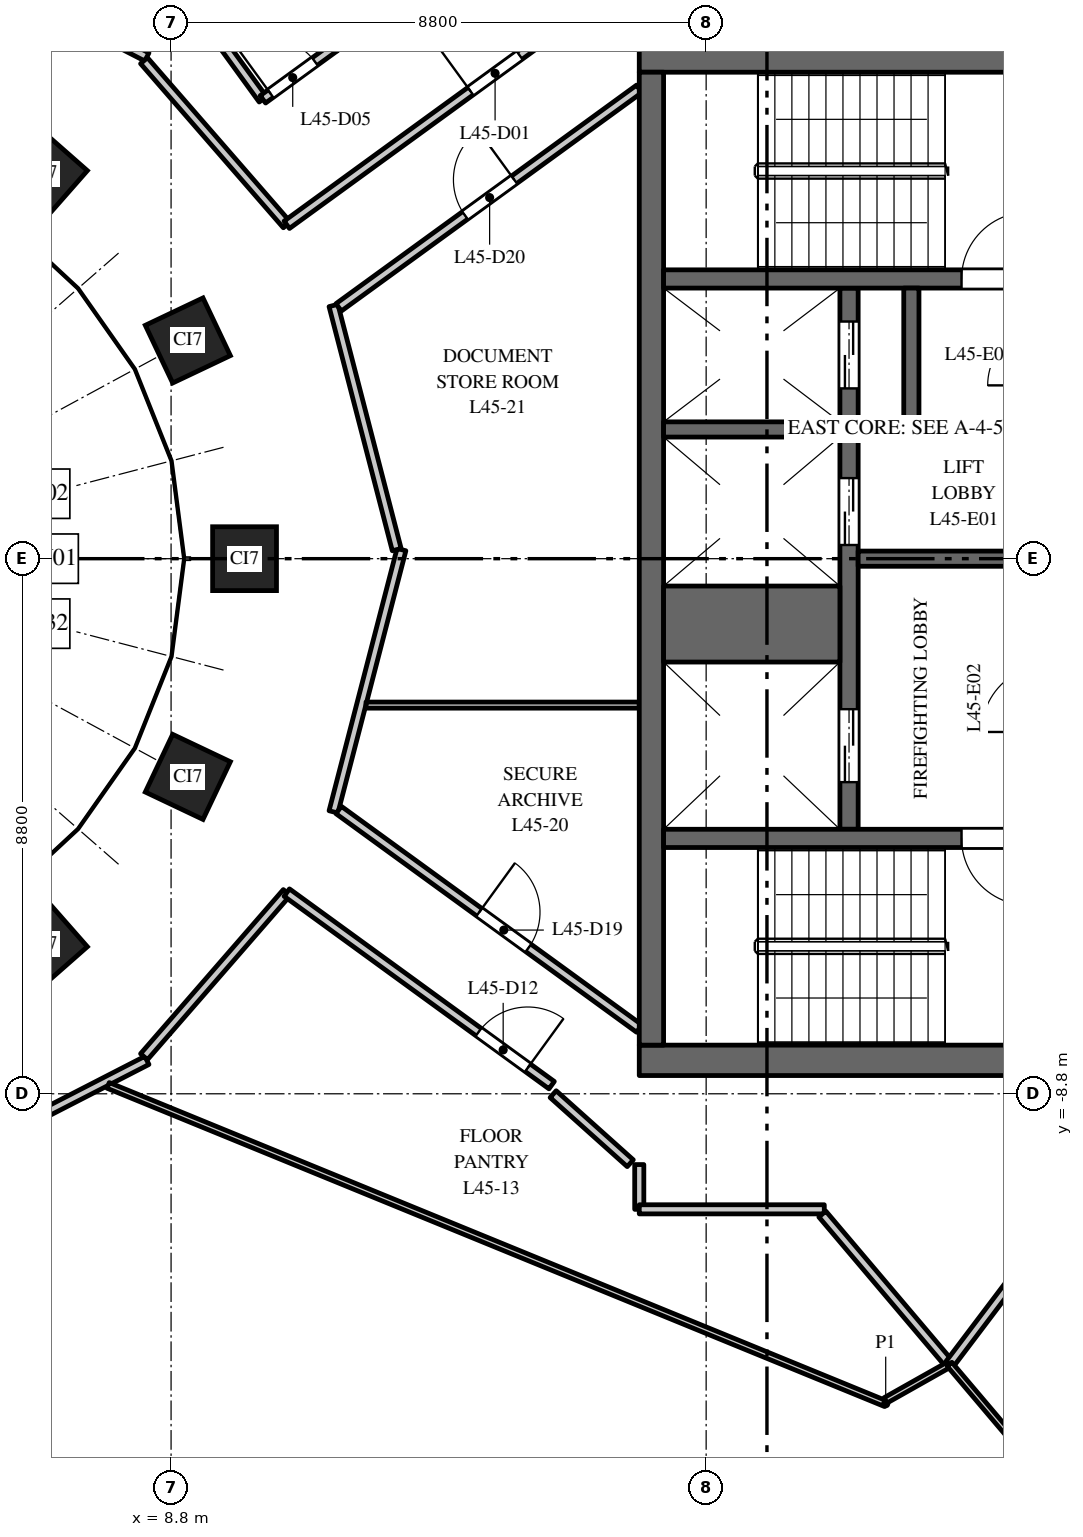
"""IFC4 building model, lengths in metres.
Left out: names, types, materials, properties, quantities, classifications, styles, units other than length and angle.
Written with IfcOpenShell. Run it as: python <this file> out.ifc"""

import sys

from ifc_helpers import new_model, si_unit, direction, frame, frame_2d, origin, origin_2d, place, context, subcontext, project, spatial, rectangle, extrude, element, fill, save


model = new_model("IFC4")
c1 = context("Model", 3, precision=1e-05, world=origin(), true_north=direction((0.0, 1.0)))
c2 = subcontext(c1, "Body", "Model", "MODEL_VIEW")
j1 = project(units=[si_unit("LENGTHUNIT", "METRE"), si_unit("PLANEANGLEUNIT", "RADIAN")], contexts=[c1])
p1 = place(None, origin())
s1 = spatial("IfcSite", under=j1, at=p1, CompositionType="ELEMENT")
p2 = place(p1, origin())
s2 = spatial("IfcBuilding", under=s1, at=p2, CompositionType="ELEMENT")
p3 = place(p2, frame((0.0, 0.0, 194.0)))
s3 = spatial("IfcBuildingStorey", under=s2, at=p3, CompositionType="ELEMENT", Elevation=194.0)
for number, where, z_axis, x_axis in (
    (1, (10.008, 0.0, 0.0), (0.0, 0.0, 1.0), (0.0, 1.0, 0.0)),
    (2, (9.076, 3.588, 0.0), (0.0, 0.0, 1.0), (-0.429, 0.903, 0.0)),
    (3, (6.682, 6.334, 0.0), (0.0, 0.0, 1.0), (-0.751, 0.66, 0.0)),
    (4, (6.682, -6.334, 0.0), (0.0, 0.0, 1.0), (0.751, 0.66, 0.0)),
    (5, (9.076, -3.588, 0.0), (0.0, 0.0, 1.0), (0.429, 0.903, 0.0)),
):
    element("IfcColumn", number, at=place(p3, frame(where, z_axis=z_axis, x_axis=x_axis)), inside=s3, PredefinedType="COLUMN", context=c2, shape_type="SweptSolid", body=[
        extrude(rectangle(XDim=1.05, YDim=1.05, at=origin_2d()), origin(), (0.0, 0.0, 1.0), 4.0),
    ])
p4 = place(p3, frame((16.5, 8.25, 0.0), z_axis=(0.0, 0.0, 1.0), x_axis=(1.0, 0.0, 0.0)))
e6 = element("IfcWall", 6, at=p4, inside=s3, PredefinedType="SHEAR", context=c2, shape_type="SweptSolid", body=[
    extrude(rectangle(XDim=15.0, YDim=0.5, at=frame_2d((7.5, 0.0))), origin(), (0.0, 0.0, 1.0), 3.7),
])
p5 = place(p4, frame((6.9, 0.0, 0.0)))
e7 = element("IfcOpeningElement", 7, at=p5, cuts=e6, PredefinedType="OPENING", context=c2, shape_type="SweptSolid", body=[
    extrude(rectangle(XDim=1.2, YDim=2.1, at=frame_2d((0.6, 1.05))), frame((0.0, 0.26, 0.0), z_axis=(0.0, -1.0, 0.0), x_axis=(1.0, 0.0, 0.0)), (0.0, 0.0, 1.0), 0.52),
])
p6 = place(p4, frame((12.05, 0.0, 0.0)))
e8 = element("IfcOpeningElement", 8, at=p6, cuts=e6, PredefinedType="OPENING", context=c2, shape_type="SweptSolid", body=[
    extrude(rectangle(XDim=0.9, YDim=2.1, at=frame_2d((0.45, 1.05))), frame((0.0, 0.26, 0.0), z_axis=(0.0, -1.0, 0.0), x_axis=(1.0, 0.0, 0.0)), (0.0, 0.0, 1.0), 0.52),
])
p7 = place(p3, frame((16.5, -8.25, 0.0), z_axis=(0.0, 0.0, 1.0), x_axis=(1.0, 0.0, 0.0)))
e9 = element("IfcWall", 9, at=p7, inside=s3, PredefinedType="SHEAR", context=c2, shape_type="SweptSolid", body=[
    extrude(rectangle(XDim=15.0, YDim=0.5, at=frame_2d((7.5, 0.0))), origin(), (0.0, 0.0, 1.0), 3.7),
])
p8 = place(p7, frame((6.9, 0.0, 0.0)))
e10 = element("IfcOpeningElement", 10, at=p8, cuts=e9, PredefinedType="OPENING", context=c2, shape_type="SweptSolid", body=[
    extrude(rectangle(XDim=1.2, YDim=2.1, at=frame_2d((0.6, 1.05))), frame((0.0, 0.26, 0.0), z_axis=(0.0, -1.0, 0.0), x_axis=(1.0, 0.0, 0.0)), (0.0, 0.0, 1.0), 0.52),
])
p9 = place(p7, frame((12.425, 0.0, 0.0)))
e11 = element("IfcOpeningElement", 11, at=p9, cuts=e9, PredefinedType="OPENING", context=c2, shape_type="SweptSolid", body=[
    extrude(rectangle(XDim=0.9, YDim=2.1, at=frame_2d((0.45, 1.05))), frame((0.0, 0.26, 0.0), z_axis=(0.0, -1.0, 0.0), x_axis=(1.0, 0.0, 0.0)), (0.0, 0.0, 1.0), 0.52),
])
p10 = place(p3, frame((19.95, -4.45, 0.0), z_axis=(0.0, 0.0, 1.0), x_axis=(0.0, 1.0, 0.0)))
e12 = element("IfcWall", 12, at=p10, inside=s3, PredefinedType="SHEAR", context=c2, shape_type="SweptSolid", body=[
    extrude(rectangle(XDim=8.9, YDim=0.3, at=frame_2d((4.45, 0.0))), origin(), (0.0, 0.0, 1.0), 3.7),
])
p11 = place(p10, frame((0.775, 0.0, 0.0)))
e13 = element("IfcOpeningElement", 13, at=p11, cuts=e12, PredefinedType="OPENING", context=c2, shape_type="SweptSolid", body=[
    extrude(rectangle(XDim=1.2, YDim=2.1, at=frame_2d((0.6, 1.05))), frame((0.0, 0.16, 0.0), z_axis=(0.0, -1.0, 0.0), x_axis=(1.0, 0.0, 0.0)), (0.0, 0.0, 1.0), 0.32),
])
p12 = place(p10, frame((4.675, 0.0, 0.0)))
e14 = element("IfcOpeningElement", 14, at=p12, cuts=e12, PredefinedType="OPENING", context=c2, shape_type="SweptSolid", body=[
    extrude(rectangle(XDim=1.1, YDim=2.1, at=frame_2d((0.55, 1.05))), frame((0.0, 0.16, 0.0), z_axis=(0.0, -1.0, 0.0), x_axis=(1.0, 0.0, 0.0)), (0.0, 0.0, 1.0), 0.32),
])
p13 = place(p10, frame((7.25, 0.0, 0.0)))
e15 = element("IfcOpeningElement", 15, at=p13, cuts=e12, PredefinedType="OPENING", context=c2, shape_type="SweptSolid", body=[
    extrude(rectangle(XDim=1.1, YDim=2.1, at=frame_2d((0.55, 1.05))), frame((0.0, 0.16, 0.0), z_axis=(0.0, -1.0, 0.0), x_axis=(1.0, 0.0, 0.0)), (0.0, 0.0, 1.0), 0.32),
])
p14 = place(p3, frame((20.1, 0.0, 0.0), z_axis=(0.0, 0.0, 1.0), x_axis=(1.0, 0.0, 0.0)))
e16 = element("IfcWall", 16, at=p14, inside=s3, PredefinedType="SHEAR", context=c2, shape_type="SweptSolid", body=[
    extrude(rectangle(XDim=3.28, YDim=0.25, at=frame_2d((1.64, 0.0))), origin(), (0.0, 0.0, 1.0), 3.7),
])
p15 = place(p3, frame((16.7, -8.0, 0.0), z_axis=(0.0, 0.0, 1.0), x_axis=(0.0, 1.0, 0.0)))
e17 = element("IfcWall", 17, at=p15, inside=s3, PredefinedType="SHEAR", context=c2, shape_type="SweptSolid", body=[
    extrude(rectangle(XDim=16.0, YDim=0.4, at=frame_2d((8.0, 0.0))), origin(), (0.0, 0.0, 1.0), 3.7),
])
p16 = place(p3, frame((16.9, -1.075, 0.0), z_axis=(0.0, 0.0, 1.0), x_axis=(1.0, 0.0, 0.0)))
e18 = element("IfcWall", 18, at=p16, inside=s3, PredefinedType="SHEAR", context=c2, shape_type="SweptSolid", body=[
    extrude(rectangle(XDim=2.9, YDim=1.25, at=frame_2d((1.45, 0.0))), origin(), (0.0, 0.0, 1.0), 3.7),
])
p17 = place(p3, frame((16.9, 2.125, 0.0), z_axis=(0.0, 0.0, 1.0), x_axis=(1.0, 0.0, 0.0)))
e19 = element("IfcWall", 19, at=p17, inside=s3, PredefinedType="SHEAR", context=c2, shape_type="SweptSolid", body=[
    extrude(rectangle(XDim=2.9, YDim=0.25, at=frame_2d((1.45, 0.0))), origin(), (0.0, 0.0, 1.0), 3.7),
])
p18 = place(p3, frame((16.9, 4.6, 0.0), z_axis=(0.0, 0.0, 1.0), x_axis=(1.0, 0.0, 0.0)))
e20 = element("IfcWall", 20, at=p18, inside=s3, PredefinedType="SHEAR", context=c2, shape_type="SweptSolid", body=[
    extrude(rectangle(XDim=6.18, YDim=0.3, at=frame_2d((3.09, 0.0))), origin(), (0.0, 0.0, 1.0), 3.7),
])
p19 = place(p18, frame((4.9, 0.0, 0.0)))
e21 = element("IfcOpeningElement", 21, at=p19, cuts=e20, PredefinedType="OPENING", context=c2, shape_type="SweptSolid", body=[
    extrude(rectangle(XDim=1.1, YDim=2.1, at=frame_2d((0.55, 1.05))), frame((0.0, 0.16, 0.0), z_axis=(0.0, -1.0, 0.0), x_axis=(1.0, 0.0, 0.0)), (0.0, 0.0, 1.0), 0.32),
])
p20 = place(p3, frame((16.9, -4.6, 0.0), z_axis=(0.0, 0.0, 1.0), x_axis=(1.0, 0.0, 0.0)))
e22 = element("IfcWall", 22, at=p20, inside=s3, PredefinedType="SHEAR", context=c2, shape_type="SweptSolid", body=[
    extrude(rectangle(XDim=6.18, YDim=0.3, at=frame_2d((3.09, 0.0))), origin(), (0.0, 0.0, 1.0), 3.7),
])
p21 = place(p20, frame((4.9, 0.0, 0.0)))
e23 = element("IfcOpeningElement", 23, at=p21, cuts=e22, PredefinedType="OPENING", context=c2, shape_type="SweptSolid", body=[
    extrude(rectangle(XDim=1.1, YDim=2.1, at=frame_2d((0.55, 1.05))), frame((0.0, 0.16, 0.0), z_axis=(0.0, -1.0, 0.0), x_axis=(1.0, 0.0, 0.0)), (0.0, 0.0, 1.0), 0.32),
])
p22 = place(p3, frame((20.85, 2.125, 0.0), z_axis=(0.0, 0.0, 1.0), x_axis=(1.0, 0.0, 0.0)))
e24 = element("IfcWall", 24, at=p22, inside=s3, PredefinedType="SHEAR", context=c2, shape_type="SweptSolid", body=[
    extrude(rectangle(XDim=2.53, YDim=0.25, at=frame_2d((1.265, 0.0))), origin(), (0.0, 0.0, 1.0), 3.7),
])
p23 = place(p3, frame((20.975, 2.25, 0.0), z_axis=(0.0, 0.0, 1.0), x_axis=(0.0, 1.0, 0.0)))
e25 = element("IfcWall", 25, at=p23, inside=s3, PredefinedType="SHEAR", context=c2, shape_type="SweptSolid", body=[
    extrude(rectangle(XDim=2.2, YDim=0.25, at=frame_2d((1.1, 0.0))), origin(), (0.0, 0.0, 1.0), 3.7),
])
for number, where, z_axis, x_axis in (
    (26, (4.459, -10.278, 0.0), (0.0, 0.0, 1.0), (0.889, 0.457, 0.0)),
    (27, (4.459, 10.278, 0.0), (0.0, 0.0, 1.0), (0.889, -0.457, 0.0)),
):
    element("IfcWall", number, at=place(p3, frame(where, z_axis=z_axis, x_axis=x_axis)), inside=s3, PredefinedType="PARTITIONING", context=c2, shape_type="SweptSolid", body=[
        extrude(rectangle(XDim=4.434, YDim=0.15, at=frame_2d((2.217, 0.0))), origin(), (0.0, 0.0, 1.0), 2.85),
    ])
p24 = place(p3, frame((7.765, -8.662, 0.0), z_axis=(0.0, 0.0, 1.0), x_axis=(0.925461374611, -0.378841977747, 0.0)))
e28 = element("IfcWall", 28, at=p24, inside=s3, PredefinedType="PARTITIONING", context=c2, shape_type="SweptSolid", body=[
    extrude(rectangle(XDim=13.818, YDim=0.1, at=frame_2d((6.909, 0.0))), origin(), (0.0, 0.0, 1.0), 3.7),
])
p25 = place(p3, frame((8.195, 10.463, 0.0), z_axis=(0.0, 0.0, 1.0), x_axis=(0.58806271403, -0.80881533391, 0.0)))
e29 = element("IfcWall", 29, at=p25, inside=s3, PredefinedType="PARTITIONING", context=c2, shape_type="SweptSolid", body=[
    extrude(rectangle(XDim=3.596, YDim=0.15, at=frame_2d((1.798, 0.0))), origin(), (0.0, 0.0, 1.0), 3.7),
])
for number, where, z_axis, x_axis in (
    (30, (8.355, -8.19, 0.0), (0.0, 0.0, 1.0), (0.656, 0.754, 0.0)),
    (31, (8.355, 8.19, 0.0), (0.0, 0.0, 1.0), (0.656, -0.754, 0.0)),
):
    element("IfcWall", number, at=place(p3, frame(where, z_axis=z_axis, x_axis=x_axis)), inside=s3, PredefinedType="PARTITIONING", context=c2, shape_type="SweptSolid", body=[
        extrude(rectangle(XDim=3.577, YDim=0.15, at=frame_2d((1.789, 0.0))), origin(), (0.0, 0.0, 1.0), 2.75),
    ])
p26 = place(p3, frame((10.31, 7.554, 0.0), z_axis=(0.0, 0.0, 1.0), x_axis=(0.808663603061, 0.588271346476, 0.0)))
e32 = element("IfcWall", 32, at=p26, inside=s3, PredefinedType="PARTITIONING", context=c2, shape_type="SweptSolid", body=[
    extrude(rectangle(XDim=1.457, YDim=0.15, at=frame_2d((0.729, 0.0))), origin(), (0.0, 0.0, 1.0), 3.7),
])
p27 = place(p26, frame((0.157, 0.0, 0.0)))
e33 = element("IfcOpeningElement", 33, at=p27, cuts=e32, PredefinedType="OPENING", context=c2, shape_type="SweptSolid", body=[
    extrude(rectangle(XDim=0.9, YDim=2.1, at=frame_2d((0.45, 1.05))), frame((0.0, 0.085, 0.0), z_axis=(0.0, -1.0, 0.0), x_axis=(1.0, 0.0, 0.0)), (0.0, 0.0, 1.0), 0.17),
])
p28 = place(p3, frame((10.703, -5.491, 0.0), z_axis=(0.0, 0.0, 1.0), x_axis=(0.808838005268, -0.588031530816, 0.0)))
e34 = element("IfcWall", 34, at=p28, inside=s3, PredefinedType="PARTITIONING", context=c2, shape_type="SweptSolid", body=[
    extrude(rectangle(XDim=5.386, YDim=0.15, at=frame_2d((2.693, 0.0))), origin(), (0.0, 0.0, 1.0), 2.75),
])
p29 = place(p28, frame((3.9, 0.0, 0.0)))
e35 = element("IfcOpeningElement", 35, at=p29, cuts=e34, PredefinedType="OPENING", context=c2, shape_type="SweptSolid", body=[
    extrude(rectangle(XDim=1.0, YDim=2.1, at=frame_2d((0.5, 1.05))), frame((0.0, 0.085, 0.0), z_axis=(0.0, -1.0, 0.0), x_axis=(1.0, 0.0, 0.0)), (0.0, 0.0, 1.0), 0.17),
])
p30 = place(p3, frame((10.703, 5.491, 0.0), z_axis=(0.0, 0.0, 1.0), x_axis=(0.808838005268, 0.588031530816, 0.0)))
e36 = element("IfcWall", 36, at=p30, inside=s3, PredefinedType="PARTITIONING", context=c2, shape_type="SweptSolid", body=[
    extrude(rectangle(XDim=5.386, YDim=0.15, at=frame_2d((2.693, 0.0))), origin(), (0.0, 0.0, 1.0), 2.75),
])
p31 = place(p30, frame((3.736, 0.0, 0.0)))
e37 = element("IfcOpeningElement", 37, at=p31, cuts=e36, PredefinedType="OPENING", context=c2, shape_type="SweptSolid", body=[
    extrude(rectangle(XDim=1.0, YDim=2.1, at=frame_2d((0.5, 1.05))), frame((0.0, 0.085, 0.0), z_axis=(0.0, -1.0, 0.0), x_axis=(1.0, 0.0, 0.0)), (0.0, 0.0, 1.0), 0.17),
])
p32 = place(p3, frame((11.471, -4.164, 0.0), z_axis=(0.0, 0.0, 1.0), x_axis=(0.250958355571, 0.967997884176, 0.0)))
e38 = element("IfcWall", 38, at=p32, inside=s3, PredefinedType="PARTITIONING", context=c2, shape_type="SweptSolid", body=[
    extrude(rectangle(XDim=4.456, YDim=0.15, at=frame_2d((2.228, 0.0))), origin(), (0.0, 0.0, 1.0), 3.7),
])
p33 = place(p3, frame((11.556, -4.133, 0.0), z_axis=(0.0, 0.0, 1.0), x_axis=(0.808869060288, -0.587988812231, 0.0)))
e39 = element("IfcWall", 39, at=p33, inside=s3, PredefinedType="PARTITIONING", context=c2, shape_type="SweptSolid", body=[
    extrude(rectangle(XDim=6.112, YDim=0.15, at=frame_2d((3.056, 0.0))), origin(), (0.0, 0.0, 1.0), 3.7),
])
p34 = place(p33, frame((2.858, 0.0, 0.0)))
e40 = element("IfcOpeningElement", 40, at=p34, cuts=e39, PredefinedType="OPENING", context=c2, shape_type="SweptSolid", body=[
    extrude(rectangle(XDim=1.0, YDim=2.1, at=frame_2d((0.5, 1.05))), frame((0.0, 0.085, 0.0), z_axis=(0.0, -1.0, 0.0), x_axis=(1.0, 0.0, 0.0)), (0.0, 0.0, 1.0), 0.17),
])
p35 = place(p3, frame((11.471, 4.164, 0.0), z_axis=(0.0, 0.0, 1.0), x_axis=(0.250753789182, -0.968050895982, 0.0)))
e41 = element("IfcWall", 41, at=p35, inside=s3, PredefinedType="PARTITIONING", context=c2, shape_type="SweptSolid", body=[
    extrude(rectangle(XDim=4.148, YDim=0.15, at=frame_2d((2.074, 0.0))), origin(), (0.0, 0.0, 1.0), 3.7),
])
p36 = place(p3, frame((11.556, 4.133, 0.0), z_axis=(0.0, 0.0, 1.0), x_axis=(0.808869060288, 0.587988812231, 0.0)))
e42 = element("IfcWall", 42, at=p36, inside=s3, PredefinedType="PARTITIONING", context=c2, shape_type="SweptSolid", body=[
    extrude(rectangle(XDim=6.112, YDim=0.15, at=frame_2d((3.056, 0.0))), origin(), (0.0, 0.0, 1.0), 3.7),
])
p37 = place(p36, frame((2.57, 0.0, 0.0)))
e43 = element("IfcOpeningElement", 43, at=p37, cuts=e42, PredefinedType="OPENING", context=c2, shape_type="SweptSolid", body=[
    extrude(rectangle(XDim=1.0, YDim=2.1, at=frame_2d((0.5, 1.05))), frame((0.0, 0.085, 0.0), z_axis=(0.0, -1.0, 0.0), x_axis=(1.0, 0.0, 0.0)), (0.0, 0.0, 1.0), 0.17),
])
p38 = place(p3, frame((12.006, -2.408, 0.0), z_axis=(0.0, 0.0, 1.0), x_axis=(1.0, 0.0, 0.0)))
e44 = element("IfcWall", 44, at=p38, inside=s3, PredefinedType="PARTITIONING", context=c2, shape_type="SweptSolid", body=[
    extrude(rectangle(XDim=4.494, YDim=0.1, at=frame_2d((2.247, 0.0))), origin(), (0.0, 0.0, 1.0), 3.7),
])
p39 = place(p3, frame((16.5, -10.7, 0.0), z_axis=(0.0, 0.0, 1.0), x_axis=(0.0, 1.0, 0.0)))
e45 = element("IfcWall", 45, at=p39, inside=s3, PredefinedType="PARTITIONING", context=c2, shape_type="SweptSolid", body=[
    extrude(rectangle(XDim=0.736, YDim=0.15, at=frame_2d((0.368, 0.0))), origin(), (0.0, 0.0, 1.0), 3.7),
])
p40 = place(p3, frame((16.5, -10.7, 0.0), z_axis=(0.0, 0.0, 1.0), x_axis=(1.0, 0.0, 0.0)))
e46 = element("IfcWall", 46, at=p40, inside=s3, PredefinedType="PARTITIONING", context=c2, shape_type="SweptSolid", body=[
    extrude(rectangle(XDim=3.043, YDim=0.15, at=frame_2d((1.521, 0.0))), origin(), (0.0, 0.0, 1.0), 3.7),
])
p41 = place(p3, frame((19.511, -10.778, 0.0), z_axis=(0.0, 0.0, 1.0), x_axis=(0.646314086505, -0.763071491792, 0.0)))
e47 = element("IfcWall", 47, at=p41, inside=s3, PredefinedType="PARTITIONING", context=c2, shape_type="SweptSolid", body=[
    extrude(rectangle(XDim=3.237, YDim=0.15, at=frame_2d((1.618, 0.0))), origin(), (0.0, 0.0, 1.0), 3.7),
])
p42 = place(p3, frame((20.55, -13.842, 0.0), z_axis=(0.0, 0.0, 1.0), x_axis=(0.870976251911, 0.491325114978, 0.0)))
e48 = element("IfcWall", 48, at=p42, inside=s3, PredefinedType="PARTITIONING", context=c2, shape_type="SweptSolid", body=[
    extrude(rectangle(XDim=1.209, YDim=0.1, at=frame_2d((0.604, 0.0))), origin(), (0.0, 0.0, 1.0), 3.7),
])
p43 = place(p3, frame((21.603, -13.248, 0.0), z_axis=(0.0, 0.0, 1.0), x_axis=(0.60303683539, 0.797713341472, 0.0)))
e49 = element("IfcWall", 49, at=p43, inside=s3, PredefinedType="PARTITIONING", context=c2, shape_type="SweptSolid", body=[
    extrude(rectangle(XDim=3.288, YDim=0.15, at=frame_2d((1.644, 0.0))), origin(), (0.0, 0.0, 1.0), 2.75),
])
p44 = place(p3, frame((21.603, -13.248, 0.0), z_axis=(0.0, 0.0, 1.0), x_axis=(0.646437509972, -0.762966936179, 0.0)))
e50 = element("IfcWall", 50, at=p44, inside=s3, PredefinedType="PARTITIONING", context=c2, shape_type="SweptSolid", body=[
    extrude(rectangle(XDim=7.467, YDim=0.1, at=frame_2d((3.733, 0.0))), origin(), (0.0, 0.0, 1.0), 2.9),
])
p45 = place(p3, frame((16.352, -9.942, 0.0), z_axis=(0.0, 0.0, 1.0), x_axis=(-0.744832366149, 0.667251636444, 0.0)))
e51 = element("IfcWall", 51, at=p45, inside=s3, PredefinedType="PARTITIONING", context=c2, shape_type="SweptSolid", body=[
    extrude(rectangle(XDim=1.702, YDim=0.15, at=frame_2d((0.851, 0.0))), origin(), (0.0, 0.0, 1.0), 3.7),
])
p46 = place(p11, origin())
e52 = element("IfcDoor", 52, at=p46, inside=s3, OperationType="DOUBLE_DOOR_SLIDING", PredefinedType="DOOR", context=c2, shape_type="SweptSolid", body=[
    extrude(rectangle(XDim=1.2, YDim=2.1, at=frame_2d((0.6, 1.05))), frame((0.0, 0.025, 0.0), z_axis=(0.0, -1.0, 0.0), x_axis=(1.0, 0.0, 0.0)), (0.0, 0.0, 1.0), 0.05),
])
fill(e13, e52)
p47 = place(p12, origin())
e53 = element("IfcDoor", 53, at=p47, inside=s3, OperationType="DOUBLE_DOOR_SLIDING", PredefinedType="DOOR", context=c2, shape_type="SweptSolid", body=[
    extrude(rectangle(XDim=1.1, YDim=2.1, at=frame_2d((0.55, 1.05))), frame((0.0, 0.025, 0.0), z_axis=(0.0, -1.0, 0.0), x_axis=(1.0, 0.0, 0.0)), (0.0, 0.0, 1.0), 0.05),
])
fill(e14, e53)
p48 = place(p13, origin())
e54 = element("IfcDoor", 54, at=p48, inside=s3, OperationType="DOUBLE_DOOR_SLIDING", PredefinedType="DOOR", context=c2, shape_type="SweptSolid", body=[
    extrude(rectangle(XDim=1.1, YDim=2.1, at=frame_2d((0.55, 1.05))), frame((0.0, 0.025, 0.0), z_axis=(0.0, -1.0, 0.0), x_axis=(1.0, 0.0, 0.0)), (0.0, 0.0, 1.0), 0.05),
])
fill(e15, e54)
p49 = place(p19, origin())
e55 = element("IfcDoor", 55, at=p49, inside=s3, OperationType="SINGLE_SWING_LEFT", PredefinedType="DOOR", context=c2, shape_type="SweptSolid", body=[
    extrude(rectangle(XDim=1.1, YDim=2.1, at=frame_2d((0.55, 1.05))), frame((0.0, 0.025, 0.0), z_axis=(0.0, -1.0, 0.0), x_axis=(1.0, 0.0, 0.0)), (0.0, 0.0, 1.0), 0.05),
])
fill(e21, e55)
p50 = place(p21, origin())
e56 = element("IfcDoor", 56, at=p50, inside=s3, OperationType="SINGLE_SWING_RIGHT", PredefinedType="DOOR", context=c2, shape_type="SweptSolid", body=[
    extrude(rectangle(XDim=1.1, YDim=2.1, at=frame_2d((0.55, 1.05))), frame((0.0, 0.025, 0.0), z_axis=(0.0, -1.0, 0.0), x_axis=(1.0, 0.0, 0.0)), (0.0, 0.0, 1.0), 0.05),
])
fill(e23, e56)
p51 = place(p31, origin())
e57 = element("IfcDoor", 57, at=p51, inside=s3, OperationType="SINGLE_SWING_LEFT", PredefinedType="DOOR", context=c2, shape_type="SweptSolid", body=[
    extrude(rectangle(XDim=1.0, YDim=2.1, at=frame_2d((0.5, 1.05))), frame((0.0, 0.025, 0.0), z_axis=(0.0, -1.0, 0.0), x_axis=(1.0, 0.0, 0.0)), (0.0, 0.0, 1.0), 0.05),
])
fill(e37, e57)
p52 = place(p27, origin())
e58 = element("IfcDoor", 58, at=p52, inside=s3, OperationType="SINGLE_SWING_LEFT", PredefinedType="DOOR", context=c2, shape_type="SweptSolid", body=[
    extrude(rectangle(XDim=0.9, YDim=2.1, at=frame_2d((0.45, 1.05))), frame((0.0, 0.025, 0.0), z_axis=(0.0, -1.0, 0.0), x_axis=(1.0, 0.0, 0.0)), (0.0, 0.0, 1.0), 0.05),
])
fill(e33, e58)
p53 = place(p29, origin())
e59 = element("IfcDoor", 59, at=p53, inside=s3, OperationType="SINGLE_SWING_RIGHT", PredefinedType="DOOR", context=c2, shape_type="SweptSolid", body=[
    extrude(rectangle(XDim=1.0, YDim=2.1, at=frame_2d((0.5, 1.05))), frame((0.0, 0.025, 0.0), z_axis=(0.0, -1.0, 0.0), x_axis=(1.0, 0.0, 0.0)), (0.0, 0.0, 1.0), 0.05),
])
fill(e35, e59)
p54 = place(p34, origin())
e60 = element("IfcDoor", 60, at=p54, inside=s3, OperationType="SINGLE_SWING_LEFT", PredefinedType="DOOR", context=c2, shape_type="SweptSolid", body=[
    extrude(rectangle(XDim=1.0, YDim=2.1, at=frame_2d((0.5, 1.05))), frame((0.0, 0.025, 0.0), z_axis=(0.0, -1.0, 0.0), x_axis=(1.0, 0.0, 0.0)), (0.0, 0.0, 1.0), 0.05),
])
fill(e40, e60)
p55 = place(p37, origin())
e61 = element("IfcDoor", 61, at=p55, inside=s3, OperationType="SINGLE_SWING_RIGHT", PredefinedType="DOOR", context=c2, shape_type="SweptSolid", body=[
    extrude(rectangle(XDim=1.0, YDim=2.1, at=frame_2d((0.5, 1.05))), frame((0.0, 0.025, 0.0), z_axis=(0.0, -1.0, 0.0), x_axis=(1.0, 0.0, 0.0)), (0.0, 0.0, 1.0), 0.05),
])
fill(e43, e61)
save(model, sys.argv[1])
